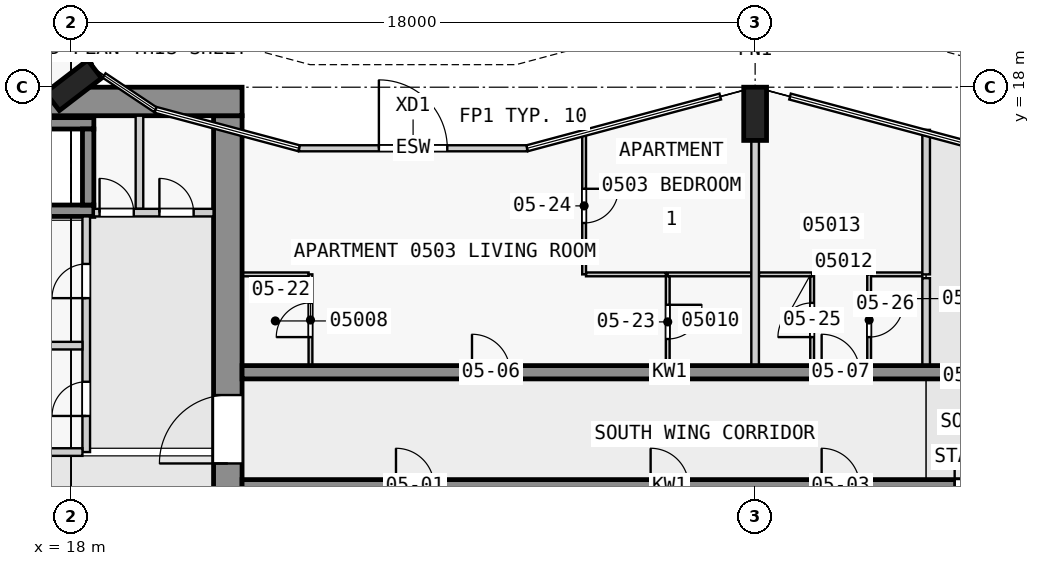
"""IFC4 building model, lengths in metres.
Left out: names, types, materials, properties, quantities, classifications, styles, units other than length and angle.
Written with IfcOpenShell. Run it as: python <this file> out.ifc"""

import sys

from ifc_helpers import new_model, si_unit, direction, frame, frame_2d, origin, origin_2d, place, context, subcontext, project, spatial, rectangle, extrude, element, fill, save


model = new_model("IFC4")
c1 = context("Model", 3, precision=1e-05, world=origin(), true_north=direction((0.0, 1.0)))
c2 = subcontext(c1, "Body", "Model", "MODEL_VIEW")
j1 = project(units=[si_unit("LENGTHUNIT", "METRE"), si_unit("PLANEANGLEUNIT", "RADIAN")], contexts=[c1])
p1 = place(None, origin())
s1 = spatial("IfcSite", under=j1, at=p1, CompositionType="ELEMENT")
p2 = place(p1, origin())
s2 = spatial("IfcBuilding", under=s1, at=p2, CompositionType="ELEMENT")
p3 = place(p2, frame((0.0, 0.0, 26.8)))
s3 = spatial("IfcBuildingStorey", under=s2, at=p3, CompositionType="ELEMENT", Elevation=26.8)
for number, where, z_axis, x_axis in (
    (1, (36.0, 17.3, 0.0), (0.0, 0.0, 1.0), (1.0, 0.0, 0.0)),
    (2, (18.065, 18.05, 0.0), (0.0, 0.0, 1.0), (-0.609, 0.793, 0.0)),
):
    element("IfcColumn", number, at=place(p3, frame(where, z_axis=z_axis, x_axis=x_axis)), inside=s3, PredefinedType="COLUMN", context=c2, shape_type="SweptSolid", body=[
        extrude(rectangle(XDim=0.6, YDim=1.4, at=origin_2d()), origin(), (0.0, 0.0, 1.0), 3.5),
    ])
p4 = place(p3, frame((1.55, 17.625, 0.0), z_axis=(0.0, 0.0, 1.0), x_axis=(1.0, 0.0, 0.0)))
e3 = element("IfcWall", 3, at=p4, inside=s3, PredefinedType="SHEAR", context=c2, shape_type="SweptSolid", body=[
    extrude(rectangle(XDim=20.95, YDim=0.75, at=frame_2d((10.475, 0.0))), origin(), (0.0, 0.0, 1.0), 3.25),
])
p5 = place(p4, frame((6.55, 0.0, 0.0)))
e4 = element("IfcOpeningElement", 4, at=p5, cuts=e3, PredefinedType="OPENING", context=c2, shape_type="SweptSolid", body=[
    extrude(rectangle(XDim=1.8, YDim=2.1, at=frame_2d((0.9, 1.05))), frame((0.0, 0.385, 0.0), z_axis=(0.0, -1.0, 0.0), x_axis=(1.0, 0.0, 0.0)), (0.0, 0.0, 1.0), 0.77),
])
p6 = place(p3, frame((22.125, 2.5, 0.0), z_axis=(0.0, 0.0, 1.0), x_axis=(0.0, 1.0, 0.0)))
e5 = element("IfcWall", 5, at=p6, inside=s3, PredefinedType="SHEAR", context=c2, shape_type="SweptSolid", body=[
    extrude(rectangle(XDim=14.75, YDim=0.75, at=frame_2d((7.375, 0.0))), origin(), (0.0, 0.0, 1.0), 3.25),
])
p7 = place(p6, frame((5.6, 0.0, 0.0)))
e6 = element("IfcOpeningElement", 6, at=p7, cuts=e5, PredefinedType="OPENING", context=c2, shape_type="SweptSolid", body=[
    extrude(rectangle(XDim=1.8, YDim=2.1, at=frame_2d((0.9, 1.05))), frame((0.0, 0.385, 0.0), z_axis=(0.0, -1.0, 0.0), x_axis=(1.0, 0.0, 0.0)), (0.0, 0.0, 1.0), 0.77),
])
for number, where, z_axis, x_axis in (
    (7, (10.8, 17.05, 0.0), (0.0, 0.0, 1.0), (1.0, 0.0, 0.0)),
    (8, (10.8, 14.75, 0.0), (0.0, 0.0, 1.0), (1.0, 0.0, 0.0)),
):
    element("IfcWall", number, at=place(p3, frame(where, z_axis=z_axis, x_axis=x_axis)), inside=s3, PredefinedType="SHEAR", context=c2, shape_type="SweptSolid", body=[
        extrude(rectangle(XDim=7.8, YDim=0.3, at=frame_2d((3.9, 0.0))), origin(), (0.0, 0.0, 1.0), 3.25),
    ])
p8 = place(p3, frame((18.45, 14.9, 0.0), z_axis=(0.0, 0.0, 1.0), x_axis=(0.0, 1.0, 0.0)))
e9 = element("IfcWall", 9, at=p8, inside=s3, PredefinedType="SHEAR", context=c2, shape_type="SweptSolid", body=[
    extrude(rectangle(XDim=2.0, YDim=0.3, at=frame_2d((1.0, 0.0))), origin(), (0.0, 0.0, 1.0), 3.25),
])
p9 = place(p3, frame((22.5, 7.5, 0.0), z_axis=(0.0, 0.0, 1.0), x_axis=(1.0, 0.0, 0.0)))
e10 = element("IfcWall", 10, at=p9, inside=s3, PredefinedType="SHEAR", context=c2, shape_type="SweptSolid", body=[
    extrude(rectangle(XDim=22.5, YDim=0.35, at=frame_2d((11.25, 0.0))), origin(), (0.0, 0.0, 1.0), 3.25),
])
p10 = place(p9, frame((4.05, 0.0, 0.0)))
e11 = element("IfcOpeningElement", 11, at=p10, cuts=e10, PredefinedType="OPENING", context=c2, shape_type="SweptSolid", body=[
    extrude(rectangle(XDim=1.0, YDim=2.1, at=frame_2d((0.5, 1.05))), frame((0.0, 0.185, 0.0), z_axis=(0.0, -1.0, 0.0), x_axis=(1.0, 0.0, 0.0)), (0.0, 0.0, 1.0), 0.37),
])
p11 = place(p9, frame((10.75, 0.0, 0.0)))
e12 = element("IfcOpeningElement", 12, at=p11, cuts=e10, PredefinedType="OPENING", context=c2, shape_type="SweptSolid", body=[
    extrude(rectangle(XDim=1.0, YDim=2.1, at=frame_2d((0.5, 1.05))), frame((0.0, 0.185, 0.0), z_axis=(0.0, -1.0, 0.0), x_axis=(1.0, 0.0, 0.0)), (0.0, 0.0, 1.0), 0.37),
])
p12 = place(p9, frame((15.25, 0.0, 0.0)))
e13 = element("IfcOpeningElement", 13, at=p12, cuts=e10, PredefinedType="OPENING", context=c2, shape_type="SweptSolid", body=[
    extrude(rectangle(XDim=1.0, YDim=2.1, at=frame_2d((0.5, 1.05))), frame((0.0, 0.185, 0.0), z_axis=(0.0, -1.0, 0.0), x_axis=(1.0, 0.0, 0.0)), (0.0, 0.0, 1.0), 0.37),
])
p13 = place(p9, frame((18.75, 0.0, 0.0)))
e14 = element("IfcOpeningElement", 14, at=p13, cuts=e10, PredefinedType="OPENING", context=c2, shape_type="SweptSolid", body=[
    extrude(rectangle(XDim=0.9, YDim=2.1, at=frame_2d((0.45, 1.05))), frame((0.0, 0.185, 0.0), z_axis=(0.0, -1.0, 0.0), x_axis=(1.0, 0.0, 0.0)), (0.0, 0.0, 1.0), 0.37),
])
p14 = place(p9, frame((20.95, 0.0, 0.0)))
e15 = element("IfcOpeningElement", 15, at=p14, cuts=e10, PredefinedType="OPENING", context=c2, shape_type="SweptSolid", body=[
    extrude(rectangle(XDim=1.0, YDim=2.1, at=frame_2d((0.5, 1.05))), frame((0.0, 0.185, 0.0), z_axis=(0.0, -1.0, 0.0), x_axis=(1.0, 0.0, 0.0)), (0.0, 0.0, 1.0), 0.37),
])
p15 = place(p3, frame((22.5, 10.5, 0.0), z_axis=(0.0, 0.0, 1.0), x_axis=(1.0, 0.0, 0.0)))
e16 = element("IfcWall", 16, at=p15, inside=s3, PredefinedType="SHEAR", context=c2, shape_type="SweptSolid", body=[
    extrude(rectangle(XDim=22.5, YDim=0.35, at=frame_2d((11.25, 0.0))), origin(), (0.0, 0.0, 1.0), 3.25),
])
p16 = place(p15, frame((6.05, 0.0, 0.0)))
e17 = element("IfcOpeningElement", 17, at=p16, cuts=e16, PredefinedType="OPENING", context=c2, shape_type="SweptSolid", body=[
    extrude(rectangle(XDim=1.0, YDim=2.1, at=frame_2d((0.5, 1.05))), frame((0.0, 0.185, 0.0), z_axis=(0.0, -1.0, 0.0), x_axis=(1.0, 0.0, 0.0)), (0.0, 0.0, 1.0), 0.37),
])
p17 = place(p15, frame((15.25, 0.0, 0.0)))
e18 = element("IfcOpeningElement", 18, at=p17, cuts=e16, PredefinedType="OPENING", context=c2, shape_type="SweptSolid", body=[
    extrude(rectangle(XDim=1.0, YDim=2.1, at=frame_2d((0.5, 1.05))), frame((0.0, 0.185, 0.0), z_axis=(0.0, -1.0, 0.0), x_axis=(1.0, 0.0, 0.0)), (0.0, 0.0, 1.0), 0.37),
])
p18 = place(p15, frame((19.75, 0.0, 0.0)))
e19 = element("IfcOpeningElement", 19, at=p18, cuts=e16, PredefinedType="OPENING", context=c2, shape_type="SweptSolid", body=[
    extrude(rectangle(XDim=1.0, YDim=2.1, at=frame_2d((0.5, 1.05))), frame((0.0, 0.185, 0.0), z_axis=(0.0, -1.0, 0.0), x_axis=(1.0, 0.0, 0.0)), (0.0, 0.0, 1.0), 0.37),
])
p19 = place(p3, frame((24.0, 16.393, 0.0), z_axis=(0.0, 0.0, 1.0), x_axis=(1.0, 0.0, 0.0)))
e20 = element("IfcWall", 20, at=p19, inside=s3, PredefinedType="STANDARD", context=c2, shape_type="SweptSolid", body=[
    extrude(rectangle(XDim=6.0, YDim=0.16, at=frame_2d((3.0, 0.0))), origin(), (0.0, 0.0, 1.0), 3.25),
])
p20 = place(p19, frame((2.1, 0.0, 0.0)))
e21 = element("IfcOpeningElement", 21, at=p20, cuts=e20, PredefinedType="OPENING", context=c2, shape_type="SweptSolid", body=[
    extrude(rectangle(XDim=1.8, YDim=2.4, at=frame_2d((0.9, 1.2))), frame((0.0, 0.09, 0.0), z_axis=(0.0, -1.0, 0.0), x_axis=(1.0, 0.0, 0.0)), (0.0, 0.0, 1.0), 0.18),
])
p21 = place(p3, frame((10.9, 8.4, 0.0), z_axis=(0.0, 0.0, 1.0), x_axis=(1.0, 0.0, 0.0)))
e22 = element("IfcWall", 22, at=p21, inside=s3, PredefinedType="PARTITIONING", context=c2, shape_type="SweptSolid", body=[
    extrude(rectangle(XDim=7.4, YDim=0.2, at=frame_2d((3.7, 0.0))), origin(), (0.0, 0.0, 1.0), 3.25),
])
p22 = place(p3, frame((18.4, 8.4, 0.0), z_axis=(0.0, 0.0, 1.0), x_axis=(0.0, 1.0, 0.0)))
e23 = element("IfcWall", 23, at=p22, inside=s3, PredefinedType="PARTITIONING", context=c2, shape_type="SweptSolid", body=[
    extrude(rectangle(XDim=6.2, YDim=0.2, at=frame_2d((3.1, 0.0))), origin(), (0.0, 0.0, 1.0), 3.25),
])
p23 = place(p22, frame((0.95, 0.0, 0.0)))
e24 = element("IfcOpeningElement", 24, at=p23, cuts=e23, PredefinedType="OPENING", context=c2, shape_type="SweptSolid", body=[
    extrude(rectangle(XDim=0.9, YDim=2.1, at=frame_2d((0.45, 1.05))), frame((0.0, 0.11, 0.0), z_axis=(0.0, -1.0, 0.0), x_axis=(1.0, 0.0, 0.0)), (0.0, 0.0, 1.0), 0.22),
])
p24 = place(p22, frame((4.05, 0.0, 0.0)))
e25 = element("IfcOpeningElement", 25, at=p24, cuts=e23, PredefinedType="OPENING", context=c2, shape_type="SweptSolid", body=[
    extrude(rectangle(XDim=0.9, YDim=2.1, at=frame_2d((0.45, 1.05))), frame((0.0, 0.11, 0.0), z_axis=(0.0, -1.0, 0.0), x_axis=(1.0, 0.0, 0.0)), (0.0, 0.0, 1.0), 0.22),
])
p25 = place(p3, frame((10.9, 11.2, 0.0), z_axis=(0.0, 0.0, 1.0), x_axis=(1.0, 0.0, 0.0)))
e26 = element("IfcWall", 26, at=p25, inside=s3, PredefinedType="PARTITIONING", context=c2, shape_type="SweptSolid", body=[
    extrude(rectangle(XDim=7.4, YDim=0.2, at=frame_2d((3.7, 0.0))), origin(), (0.0, 0.0, 1.0), 3.25),
])
p26 = place(p3, frame((18.6, 14.7, 0.0), z_axis=(0.0, 0.0, 1.0), x_axis=(1.0, 0.0, 0.0)))
e27 = element("IfcWall", 27, at=p26, inside=s3, PredefinedType="PARTITIONING", context=c2, shape_type="SweptSolid", body=[
    extrude(rectangle(XDim=3.15, YDim=0.2, at=frame_2d((1.575, 0.0))), origin(), (0.0, 0.0, 1.0), 3.25),
])
p27 = place(p26, frame((0.15, 0.0, 0.0)))
e28 = element("IfcOpeningElement", 28, at=p27, cuts=e27, PredefinedType="OPENING", context=c2, shape_type="SweptSolid", body=[
    extrude(rectangle(XDim=0.9, YDim=2.1, at=frame_2d((0.45, 1.05))), frame((0.0, 0.11, 0.0), z_axis=(0.0, -1.0, 0.0), x_axis=(1.0, 0.0, 0.0)), (0.0, 0.0, 1.0), 0.22),
])
p28 = place(p26, frame((1.725, 0.0, 0.0)))
e29 = element("IfcOpeningElement", 29, at=p28, cuts=e27, PredefinedType="OPENING", context=c2, shape_type="SweptSolid", body=[
    extrude(rectangle(XDim=0.9, YDim=2.1, at=frame_2d((0.45, 1.05))), frame((0.0, 0.11, 0.0), z_axis=(0.0, -1.0, 0.0), x_axis=(1.0, 0.0, 0.0)), (0.0, 0.0, 1.0), 0.22),
])
p29 = place(p3, frame((19.8, 14.8, 0.0), z_axis=(0.0, 0.0, 1.0), x_axis=(0.0, 1.0, 0.0)))
e30 = element("IfcWall", 30, at=p29, inside=s3, PredefinedType="PARTITIONING", context=c2, shape_type="SweptSolid", body=[
    extrude(rectangle(XDim=2.45, YDim=0.2, at=frame_2d((1.225, 0.0))), origin(), (0.0, 0.0, 1.0), 3.25),
])
p30 = place(p3, frame((24.25, 13.075, 0.0), z_axis=(0.0, 0.0, 1.0), x_axis=(-1.0, 0.0, 0.0)))
e31 = element("IfcWall", 31, at=p30, inside=s3, PredefinedType="PARTITIONING", context=c2, shape_type="SweptSolid", body=[
    extrude(rectangle(XDim=1.75, YDim=0.1, at=frame_2d((0.875, 0.0))), origin(), (0.0, 0.0, 1.0), 3.25),
])
p31 = place(p3, frame((35.9, 13.075, 0.0), z_axis=(0.0, 0.0, 1.0), x_axis=(-1.0, 0.0, 0.0)))
e32 = element("IfcWall", 32, at=p31, inside=s3, PredefinedType="PARTITIONING", context=c2, shape_type="SweptSolid", body=[
    extrude(rectangle(XDim=2.2, YDim=0.1, at=frame_2d((1.1, 0.0))), origin(), (0.0, 0.0, 1.0), 3.25),
])
p32 = place(p3, frame((37.5, 13.075, 0.0), z_axis=(0.0, 0.0, 1.0), x_axis=(-1.0, 0.0, 0.0)))
e33 = element("IfcWall", 33, at=p32, inside=s3, PredefinedType="PARTITIONING", context=c2, shape_type="SweptSolid", body=[
    extrude(rectangle(XDim=1.4, YDim=0.1, at=frame_2d((0.7, 0.0))), origin(), (0.0, 0.0, 1.0), 3.25),
])
p33 = place(p3, frame((40.4, 13.075, 0.0), z_axis=(0.0, 0.0, 1.0), x_axis=(-1.0, 0.0, 0.0)))
e34 = element("IfcWall", 34, at=p33, inside=s3, PredefinedType="PARTITIONING", context=c2, shape_type="SweptSolid", body=[
    extrude(rectangle(XDim=1.35, YDim=0.1, at=frame_2d((0.675, 0.0))), origin(), (0.0, 0.0, 1.0), 3.25),
])
p34 = place(p3, frame((31.55, 13.075, 0.0), z_axis=(0.0, 0.0, 1.0), x_axis=(1.0, 0.0, 0.0)))
e35 = element("IfcWall", 35, at=p34, inside=s3, PredefinedType="PARTITIONING", context=c2, shape_type="SweptSolid", body=[
    extrude(rectangle(XDim=2.1, YDim=0.1, at=frame_2d((1.05, 0.0))), origin(), (0.0, 0.0, 1.0), 3.25),
])
p35 = place(p3, frame((24.3, 10.675, 0.0), z_axis=(0.0, 0.0, 1.0), x_axis=(0.0, 1.0, 0.0)))
e36 = element("IfcWall", 36, at=p35, inside=s3, PredefinedType="PARTITIONING", context=c2, shape_type="SweptSolid", body=[
    extrude(rectangle(XDim=2.4, YDim=0.1, at=frame_2d((1.2, 0.0))), origin(), (0.0, 0.0, 1.0), 3.25),
])
p36 = place(p35, frame((0.75, 0.0, 0.0)))
e37 = element("IfcOpeningElement", 37, at=p36, cuts=e36, PredefinedType="OPENING", context=c2, shape_type="SweptSolid", body=[
    extrude(rectangle(XDim=0.9, YDim=2.1, at=frame_2d((0.45, 1.05))), frame((0.0, 0.06, 0.0), z_axis=(0.0, -1.0, 0.0), x_axis=(1.0, 0.0, 0.0)), (0.0, 0.0, 1.0), 0.12),
])
p37 = place(p3, frame((31.5, 16.878, 0.0), z_axis=(0.0, 0.0, 1.0), x_axis=(0.0, -1.0, 0.0)))
e38 = element("IfcWall", 38, at=p37, inside=s3, PredefinedType="PARTITIONING", context=c2, shape_type="SweptSolid", body=[
    extrude(rectangle(XDim=3.803, YDim=0.1, at=frame_2d((1.901, 0.0))), origin(), (0.0, 0.0, 1.0), 3.25),
])
p38 = place(p37, frame((1.55, 0.0, 0.0)))
e39 = element("IfcOpeningElement", 39, at=p38, cuts=e38, PredefinedType="OPENING", context=c2, shape_type="SweptSolid", body=[
    extrude(rectangle(XDim=0.9, YDim=2.1, at=frame_2d((0.45, 1.05))), frame((0.0, 0.06, 0.0), z_axis=(0.0, -1.0, 0.0), x_axis=(1.0, 0.0, 0.0)), (0.0, 0.0, 1.0), 0.12),
])
p39 = place(p3, frame((33.7, 13.025, 0.0), z_axis=(0.0, 0.0, 1.0), x_axis=(0.0, -1.0, 0.0)))
e40 = element("IfcWall", 40, at=p39, inside=s3, PredefinedType="PARTITIONING", context=c2, shape_type="SweptSolid", body=[
    extrude(rectangle(XDim=2.35, YDim=0.1, at=frame_2d((1.175, 0.0))), origin(), (0.0, 0.0, 1.0), 3.25),
])
p40 = place(p39, frame((0.75, 0.0, 0.0)))
e41 = element("IfcOpeningElement", 41, at=p40, cuts=e40, PredefinedType="OPENING", context=c2, shape_type="SweptSolid", body=[
    extrude(rectangle(XDim=0.9, YDim=2.1, at=frame_2d((0.45, 1.05))), frame((0.0, 0.06, 0.0), z_axis=(0.0, -1.0, 0.0), x_axis=(1.0, 0.0, 0.0)), (0.0, 0.0, 1.0), 0.12),
])
p41 = place(p3, frame((36.0, 10.675, 0.0), z_axis=(0.0, 0.0, 1.0), x_axis=(0.0, 1.0, 0.0)))
e42 = element("IfcWall", 42, at=p41, inside=s3, PredefinedType="PARTITIONING", context=c2, shape_type="SweptSolid", body=[
    extrude(rectangle(XDim=5.925, YDim=0.2, at=frame_2d((2.962, 0.0))), origin(), (0.0, 0.0, 1.0), 3.25),
])
p42 = place(p3, frame((37.5, 10.675, 0.0), z_axis=(0.0, 0.0, 1.0), x_axis=(0.0, 1.0, 0.0)))
e43 = element("IfcWall", 43, at=p42, inside=s3, PredefinedType="PARTITIONING", context=c2, shape_type="SweptSolid", body=[
    extrude(rectangle(XDim=2.35, YDim=0.1, at=frame_2d((1.175, 0.0))), origin(), (0.0, 0.0, 1.0), 3.25),
])
p43 = place(p42, frame((0.75, 0.0, 0.0)))
e44 = element("IfcOpeningElement", 44, at=p43, cuts=e43, PredefinedType="OPENING", context=c2, shape_type="SweptSolid", body=[
    extrude(rectangle(XDim=0.9, YDim=2.1, at=frame_2d((0.45, 1.05))), frame((0.0, 0.06, 0.0), z_axis=(0.0, -1.0, 0.0), x_axis=(1.0, 0.0, 0.0)), (0.0, 0.0, 1.0), 0.12),
])
p44 = place(p3, frame((39.0, 13.075, 0.0), z_axis=(0.0, 0.0, 1.0), x_axis=(0.0, -1.0, 0.0)))
e45 = element("IfcWall", 45, at=p44, inside=s3, PredefinedType="PARTITIONING", context=c2, shape_type="SweptSolid", body=[
    extrude(rectangle(XDim=2.4, YDim=0.1, at=frame_2d((1.2, 0.0))), origin(), (0.0, 0.0, 1.0), 3.25),
])
p45 = place(p44, frame((0.75, 0.0, 0.0)))
e46 = element("IfcOpeningElement", 46, at=p45, cuts=e45, PredefinedType="OPENING", context=c2, shape_type="SweptSolid", body=[
    extrude(rectangle(XDim=0.9, YDim=2.1, at=frame_2d((0.45, 1.05))), frame((0.0, 0.06, 0.0), z_axis=(0.0, -1.0, 0.0), x_axis=(1.0, 0.0, 0.0)), (0.0, 0.0, 1.0), 0.12),
])
p46 = place(p3, frame((40.5, 16.878, 0.0), z_axis=(0.0, 0.0, 1.0), x_axis=(0.0, -1.0, 0.0)))
e47 = element("IfcWall", 47, at=p46, inside=s3, PredefinedType="PARTITIONING", context=c2, shape_type="SweptSolid", body=[
    extrude(rectangle(XDim=3.803, YDim=0.2, at=frame_2d((1.901, 0.0))), origin(), (0.0, 0.0, 1.0), 3.25),
])
p47 = place(p3, frame((40.5, 10.675, 0.0), z_axis=(0.0, 0.0, 1.0), x_axis=(0.0, 1.0, 0.0)))
e48 = element("IfcWall", 48, at=p47, inside=s3, PredefinedType="PARTITIONING", context=c2, shape_type="SweptSolid", body=[
    extrude(rectangle(XDim=2.3, YDim=0.2, at=frame_2d((1.15, 0.0))), origin(), (0.0, 0.0, 1.0), 3.25),
])
p48 = place(p20, origin())
e49 = element("IfcDoor", 49, at=p48, inside=s3, OperationType="SINGLE_SWING_LEFT", PredefinedType="DOOR", context=c2, shape_type="SweptSolid", body=[
    extrude(rectangle(XDim=1.8, YDim=2.4, at=frame_2d((0.9, 1.2))), frame((0.0, 0.025, 0.0), z_axis=(0.0, -1.0, 0.0), x_axis=(1.0, 0.0, 0.0)), (0.0, 0.0, 1.0), 0.05),
])
fill(e21, e49)
p49 = place(p23, origin())
e50 = element("IfcDoor", 50, at=p49, inside=s3, OperationType="SINGLE_SWING_LEFT", PredefinedType="DOOR", context=c2, shape_type="SweptSolid", body=[
    extrude(rectangle(XDim=0.9, YDim=2.1, at=frame_2d((0.45, 1.05))), frame((0.0, 0.025, 0.0), z_axis=(0.0, -1.0, 0.0), x_axis=(1.0, 0.0, 0.0)), (0.0, 0.0, 1.0), 0.05),
])
fill(e24, e50)
p50 = place(p24, origin())
e51 = element("IfcDoor", 51, at=p50, inside=s3, OperationType="SINGLE_SWING_LEFT", PredefinedType="DOOR", context=c2, shape_type="SweptSolid", body=[
    extrude(rectangle(XDim=0.9, YDim=2.1, at=frame_2d((0.45, 1.05))), frame((0.0, 0.025, 0.0), z_axis=(0.0, -1.0, 0.0), x_axis=(1.0, 0.0, 0.0)), (0.0, 0.0, 1.0), 0.05),
])
fill(e25, e51)
p51 = place(p7, origin())
e52 = element("IfcDoor", 52, at=p51, inside=s3, OperationType="DOUBLE_DOOR_SINGLE_SWING", PredefinedType="DOOR", context=c2, shape_type="SweptSolid", body=[
    extrude(rectangle(XDim=1.8, YDim=2.1, at=frame_2d((0.9, 1.05))), frame((0.0, 0.025, 0.0), z_axis=(0.0, -1.0, 0.0), x_axis=(1.0, 0.0, 0.0)), (0.0, 0.0, 1.0), 0.05),
])
fill(e6, e52)
p52 = place(p27, origin())
e53 = element("IfcDoor", 53, at=p52, inside=s3, OperationType="SINGLE_SWING_LEFT", PredefinedType="DOOR", context=c2, shape_type="SweptSolid", body=[
    extrude(rectangle(XDim=0.9, YDim=2.1, at=frame_2d((0.45, 1.05))), frame((0.0, 0.025, 0.0), z_axis=(0.0, -1.0, 0.0), x_axis=(1.0, 0.0, 0.0)), (0.0, 0.0, 1.0), 0.05),
])
fill(e28, e53)
p53 = place(p28, origin())
e54 = element("IfcDoor", 54, at=p53, inside=s3, OperationType="SINGLE_SWING_LEFT", PredefinedType="DOOR", context=c2, shape_type="SweptSolid", body=[
    extrude(rectangle(XDim=0.9, YDim=2.1, at=frame_2d((0.45, 1.05))), frame((0.0, 0.025, 0.0), z_axis=(0.0, -1.0, 0.0), x_axis=(1.0, 0.0, 0.0)), (0.0, 0.0, 1.0), 0.05),
])
fill(e29, e54)
p54 = place(p10, origin())
e55 = element("IfcDoor", 55, at=p54, inside=s3, OperationType="SINGLE_SWING_LEFT", PredefinedType="DOOR", context=c2, shape_type="SweptSolid", body=[
    extrude(rectangle(XDim=1.0, YDim=2.1, at=frame_2d((0.5, 1.05))), frame((0.0, 0.025, 0.0), z_axis=(0.0, -1.0, 0.0), x_axis=(1.0, 0.0, 0.0)), (0.0, 0.0, 1.0), 0.05),
])
fill(e11, e55)
p55 = place(p11, origin())
e56 = element("IfcDoor", 56, at=p55, inside=s3, OperationType="SINGLE_SWING_LEFT", PredefinedType="DOOR", context=c2, shape_type="SweptSolid", body=[
    extrude(rectangle(XDim=1.0, YDim=2.1, at=frame_2d((0.5, 1.05))), frame((0.0, 0.025, 0.0), z_axis=(0.0, -1.0, 0.0), x_axis=(1.0, 0.0, 0.0)), (0.0, 0.0, 1.0), 0.05),
])
fill(e12, e56)
p56 = place(p12, origin())
e57 = element("IfcDoor", 57, at=p56, inside=s3, OperationType="SINGLE_SWING_RIGHT", PredefinedType="DOOR", context=c2, shape_type="SweptSolid", body=[
    extrude(rectangle(XDim=1.0, YDim=2.1, at=frame_2d((0.5, 1.05))), frame((0.0, 0.025, 0.0), z_axis=(0.0, -1.0, 0.0), x_axis=(1.0, 0.0, 0.0)), (0.0, 0.0, 1.0), 0.05),
])
fill(e13, e57)
p57 = place(p13, origin())
e58 = element("IfcDoor", 58, at=p57, inside=s3, OperationType="SINGLE_SWING_RIGHT", PredefinedType="DOOR", context=c2, shape_type="SweptSolid", body=[
    extrude(rectangle(XDim=0.9, YDim=2.1, at=frame_2d((0.45, 1.05))), frame((0.0, 0.025, 0.0), z_axis=(0.0, -1.0, 0.0), x_axis=(1.0, 0.0, 0.0)), (0.0, 0.0, 1.0), 0.05),
])
fill(e14, e58)
p58 = place(p16, origin())
e59 = element("IfcDoor", 59, at=p58, inside=s3, OperationType="SINGLE_SWING_LEFT", PredefinedType="DOOR", context=c2, shape_type="SweptSolid", body=[
    extrude(rectangle(XDim=1.0, YDim=2.1, at=frame_2d((0.5, 1.05))), frame((0.0, 0.025, 0.0), z_axis=(0.0, -1.0, 0.0), x_axis=(1.0, 0.0, 0.0)), (0.0, 0.0, 1.0), 0.05),
])
fill(e17, e59)
p59 = place(p17, origin())
e60 = element("IfcDoor", 60, at=p59, inside=s3, OperationType="SINGLE_SWING_RIGHT", PredefinedType="DOOR", context=c2, shape_type="SweptSolid", body=[
    extrude(rectangle(XDim=1.0, YDim=2.1, at=frame_2d((0.5, 1.05))), frame((0.0, 0.025, 0.0), z_axis=(0.0, -1.0, 0.0), x_axis=(1.0, 0.0, 0.0)), (0.0, 0.0, 1.0), 0.05),
])
fill(e18, e60)
p60 = place(p36, origin())
e61 = element("IfcDoor", 61, at=p60, inside=s3, OperationType="SINGLE_SWING_RIGHT", PredefinedType="DOOR", context=c2, shape_type="SweptSolid", body=[
    extrude(rectangle(XDim=0.9, YDim=2.1, at=frame_2d((0.45, 1.05))), frame((0.0, 0.025, 0.0), z_axis=(0.0, -1.0, 0.0), x_axis=(1.0, 0.0, 0.0)), (0.0, 0.0, 1.0), 0.05),
])
fill(e37, e61)
p61 = place(p40, origin())
e62 = element("IfcDoor", 62, at=p61, inside=s3, OperationType="SINGLE_SWING_RIGHT", PredefinedType="DOOR", context=c2, shape_type="SweptSolid", body=[
    extrude(rectangle(XDim=0.9, YDim=2.1, at=frame_2d((0.45, 1.05))), frame((0.0, 0.025, 0.0), z_axis=(0.0, -1.0, 0.0), x_axis=(1.0, 0.0, 0.0)), (0.0, 0.0, 1.0), 0.05),
])
fill(e41, e62)
p62 = place(p38, origin())
e63 = element("IfcDoor", 63, at=p62, inside=s3, OperationType="SINGLE_SWING_RIGHT", PredefinedType="DOOR", context=c2, shape_type="SweptSolid", body=[
    extrude(rectangle(XDim=0.9, YDim=2.1, at=frame_2d((0.45, 1.05))), frame((0.0, 0.025, 0.0), z_axis=(0.0, -1.0, 0.0), x_axis=(1.0, 0.0, 0.0)), (0.0, 0.0, 1.0), 0.05),
])
fill(e39, e63)
p63 = place(p43, origin())
e64 = element("IfcDoor", 64, at=p63, inside=s3, OperationType="SINGLE_SWING_RIGHT", PredefinedType="DOOR", context=c2, shape_type="SweptSolid", body=[
    extrude(rectangle(XDim=0.9, YDim=2.1, at=frame_2d((0.45, 1.05))), frame((0.0, 0.025, 0.0), z_axis=(0.0, -1.0, 0.0), x_axis=(1.0, 0.0, 0.0)), (0.0, 0.0, 1.0), 0.05),
])
fill(e44, e64)
p64 = place(p45, origin())
e65 = element("IfcDoor", 65, at=p64, inside=s3, OperationType="SINGLE_SWING_RIGHT", PredefinedType="DOOR", context=c2, shape_type="SweptSolid", body=[
    extrude(rectangle(XDim=0.9, YDim=2.1, at=frame_2d((0.45, 1.05))), frame((0.0, 0.025, 0.0), z_axis=(0.0, -1.0, 0.0), x_axis=(1.0, 0.0, 0.0)), (0.0, 0.0, 1.0), 0.05),
])
fill(e46, e65)
save(model, sys.argv[1])
